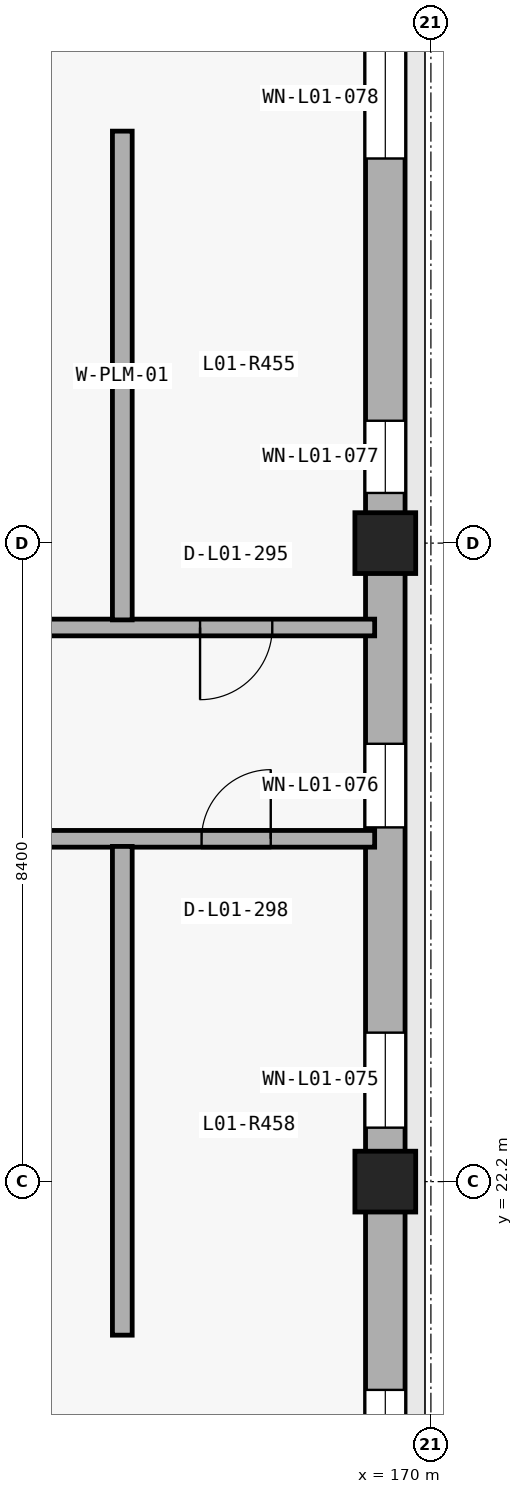
"""IFC4 building model, lengths in metres.
Left out: names, types, materials, properties, quantities, classifications, styles, units other than length and angle.
Written with IfcOpenShell. Run it as: python <this file> out.ifc"""

import sys

from ifc_helpers import new_model, si_unit, direction, frame, frame_2d, origin_with_axes, origin_2d_with_axis, place, context, subcontext, project, spatial, rectangle, circle, extrude, element, fill, save


model = new_model("IFC4")
c1 = context("Model", 3, precision=1e-05, world=origin_with_axes(), true_north=direction((0.0, 1.0)))
c2 = subcontext(c1, "Body", "Model", "MODEL_VIEW")
j1 = project(units=[si_unit("LENGTHUNIT", "METRE"), si_unit("PLANEANGLEUNIT", "RADIAN")], contexts=[c1])
p1 = place(None, origin_with_axes())
s1 = spatial("IfcSite", under=j1, at=p1, CompositionType="ELEMENT")
p2 = place(p1, origin_with_axes())
s2 = spatial("IfcBuilding", under=s1, at=p2, CompositionType="ELEMENT")
p3 = place(p2, frame((0.0, 0.0, 5.4), z_axis=(0.0, 0.0, 1.0), x_axis=(1.0, 0.0, 0.0)))
s3 = spatial("IfcBuildingStorey", under=s2, at=p3, CompositionType="ELEMENT", Elevation=5.4)
p4 = place(None, frame((169.4, 7.06, 5.4), z_axis=(0.0, 0.0, 1.0), x_axis=(0.0, 1.0, 0.0)))
e1 = element("IfcWall", 1, at=p4, inside=s3, PredefinedType="SOLIDWALL", context=c2, shape_type="SweptSolid", body=[
    extrude(rectangle(XDim=54.48, YDim=0.52, at=frame_2d((27.24, 0.0), x_axis=(1.0, 0.0))), origin_with_axes(), (0.0, 0.0, 1.0), 4.714),
])
p5 = place(None, frame((169.4, 10.31, 8.1), z_axis=(0.0, 0.0, 1.0), x_axis=(0.0, 1.0, 0.0)))
e2 = element("IfcOpeningElement", 2, at=p5, cuts=e1, PredefinedType="OPENING", context=c2, shape_type="SweptSolid", body=[
    extrude(rectangle(XDim=2.1, YDim=1.3, at=frame_2d((0.0, 0.65), x_axis=(1.0, 0.0))), frame((0.0, 0.27, 0.0), z_axis=(0.0, -1.0, 0.0), x_axis=(1.0, 0.0, 0.0)), (0.0, 0.0, 1.0), 0.54),
])
p6 = place(None, frame((169.4, 15.46, 8.15), z_axis=(0.0, 0.0, 1.0), x_axis=(0.0, 1.0, 0.0)))
e3 = element("IfcOpeningElement", 3, at=p6, cuts=e1, PredefinedType="OPENING", context=c2, shape_type="SweptSolid", body=[
    extrude(rectangle(XDim=1.8, YDim=1.2, at=frame_2d((0.0, 0.6), x_axis=(1.0, 0.0))), frame((0.0, 0.27, 0.0), z_axis=(0.0, -1.0, 0.0), x_axis=(1.0, 0.0, 0.0)), (0.0, 0.0, 1.0), 0.54),
])
p7 = place(None, frame((169.4, 18.76, 6.3), z_axis=(0.0, 0.0, 1.0), x_axis=(0.0, 1.0, 0.0)))
e4 = element("IfcOpeningElement", 4, at=p7, cuts=e1, PredefinedType="OPENING", context=c2, shape_type="SweptSolid", body=[
    extrude(rectangle(XDim=1.4, YDim=2.2, at=frame_2d((0.0, 1.1), x_axis=(1.0, 0.0))), frame((0.0, 0.27, 0.0), z_axis=(0.0, -1.0, 0.0), x_axis=(1.0, 0.0, 0.0)), (0.0, 0.0, 1.0), 0.54),
])
p8 = place(None, frame((169.4, 23.535, 6.3), z_axis=(0.0, 0.0, 1.0), x_axis=(0.0, 1.0, 0.0)))
e5 = element("IfcOpeningElement", 5, at=p8, cuts=e1, PredefinedType="OPENING", context=c2, shape_type="SweptSolid", body=[
    extrude(rectangle(XDim=1.25, YDim=2.1, at=frame_2d((0.0, 1.05), x_axis=(1.0, 0.0))), frame((0.0, 0.27, 0.0), z_axis=(0.0, -1.0, 0.0), x_axis=(1.0, 0.0, 0.0)), (0.0, 0.0, 1.0), 0.54),
])
p9 = place(None, frame((169.4, 27.41, 6.35), z_axis=(0.0, 0.0, 1.0), x_axis=(0.0, 1.0, 0.0)))
e6 = element("IfcOpeningElement", 6, at=p9, cuts=e1, PredefinedType="OPENING", context=c2, shape_type="SweptSolid", body=[
    extrude(rectangle(XDim=1.1, YDim=2.0, at=frame_2d((0.0, 1.0), x_axis=(1.0, 0.0))), frame((0.0, 0.27, 0.0), z_axis=(0.0, -1.0, 0.0), x_axis=(1.0, 0.0, 0.0)), (0.0, 0.0, 1.0), 0.54),
])
p10 = place(None, frame((169.4, 31.735, 6.35), z_axis=(0.0, 0.0, 1.0), x_axis=(0.0, 1.0, 0.0)))
e7 = element("IfcOpeningElement", 7, at=p10, cuts=e1, PredefinedType="OPENING", context=c2, shape_type="SweptSolid", body=[
    extrude(rectangle(XDim=0.95, YDim=1.95, at=frame_2d((0.0, 0.975), x_axis=(1.0, 0.0))), frame((0.0, 0.27, 0.0), z_axis=(0.0, -1.0, 0.0), x_axis=(1.0, 0.0, 0.0)), (0.0, 0.0, 1.0), 0.54),
])
p11 = place(None, frame((169.4, 36.46, 6.25), z_axis=(0.0, 0.0, 1.0), x_axis=(0.0, 1.0, 0.0)))
e8 = element("IfcOpeningElement", 8, at=p11, cuts=e1, PredefinedType="OPENING", context=c2, shape_type="SweptSolid", body=[
    extrude(rectangle(XDim=1.6, YDim=3.1, at=frame_2d((0.0, 1.55), x_axis=(1.0, 0.0))), frame((0.0, 0.27, 0.0), z_axis=(0.0, -1.0, 0.0), x_axis=(1.0, 0.0, 0.0)), (0.0, 0.0, 1.0), 0.54),
])
p12 = place(None, frame((169.4, 40.785, 6.3), z_axis=(0.0, 0.0, 1.0), x_axis=(0.0, 1.0, 0.0)))
e9 = element("IfcOpeningElement", 9, at=p12, cuts=e1, PredefinedType="OPENING", context=c2, shape_type="SweptSolid", body=[
    extrude(rectangle(XDim=1.45, YDim=2.85, at=frame_2d((0.0, 1.425), x_axis=(1.0, 0.0))), frame((0.0, 0.27, 0.0), z_axis=(0.0, -1.0, 0.0), x_axis=(1.0, 0.0, 0.0)), (0.0, 0.0, 1.0), 0.54),
])
p13 = place(None, frame((169.4, 44.835, 6.3), z_axis=(0.0, 0.0, 1.0), x_axis=(0.0, 1.0, 0.0)))
e10 = element("IfcOpeningElement", 10, at=p13, cuts=e1, PredefinedType="OPENING", context=c2, shape_type="SweptSolid", body=[
    extrude(rectangle(XDim=1.65, YDim=2.4, at=frame_2d((0.0, 1.2), x_axis=(1.0, 0.0))), frame((0.0, 0.27, 0.0), z_axis=(0.0, -1.0, 0.0), x_axis=(1.0, 0.0, 0.0)), (0.0, 0.0, 1.0), 0.54),
])
p14 = place(None, frame((169.4, 49.51, 6.3), z_axis=(0.0, 0.0, 1.0), x_axis=(0.0, 1.0, 0.0)))
e11 = element("IfcOpeningElement", 11, at=p14, cuts=e1, PredefinedType="OPENING", context=c2, shape_type="SweptSolid", body=[
    extrude(rectangle(XDim=1.3, YDim=2.25, at=frame_2d((0.0, 1.125), x_axis=(1.0, 0.0))), frame((0.0, 0.27, 0.0), z_axis=(0.0, -1.0, 0.0), x_axis=(1.0, 0.0, 0.0)), (0.0, 0.0, 1.0), 0.54),
])
p15 = place(None, frame((169.4, 53.485, 7.05), z_axis=(0.0, 0.0, 1.0), x_axis=(0.0, 1.0, 0.0)))
e12 = element("IfcOpeningElement", 12, at=p15, cuts=e1, PredefinedType="OPENING", context=c2, shape_type="SweptSolid", body=[
    extrude(rectangle(XDim=0.45, YDim=1.8, at=frame_2d((0.0, 0.9), x_axis=(1.0, 0.0))), frame((0.0, 0.27, 0.0), z_axis=(0.0, -1.0, 0.0), x_axis=(1.0, 0.0, 0.0)), (0.0, 0.0, 1.0), 0.54),
])
p16 = place(None, frame((141.755, 29.49, 5.4), z_axis=(0.0, 0.0, 1.0), x_axis=(1.0, 0.0, 0.0)))
e13 = element("IfcWall", 13, at=p16, inside=s3, PredefinedType="PARTITIONING", context=c2, shape_type="SweptSolid", body=[
    extrude(rectangle(XDim=27.505, YDim=0.22, at=frame_2d((13.752, 0.0), x_axis=(1.0, 0.0))), origin_with_axes(), (0.0, 0.0, 1.0), 5.08),
])
p17 = place(None, frame((155.877, 29.49, 5.4), z_axis=(0.0, 0.0, 1.0), x_axis=(1.0, 0.0, 0.0)))
e14 = element("IfcOpeningElement", 14, at=p17, cuts=e13, PredefinedType="OPENING", context=c2, shape_type="SweptSolid", body=[
    extrude(rectangle(XDim=1.08, YDim=2.18, at=frame_2d((0.0, 1.09), x_axis=(1.0, 0.0))), frame((0.0, 0.12, 0.0), z_axis=(0.0, -1.0, 0.0), x_axis=(1.0, 0.0, 0.0)), (0.0, 0.0, 1.0), 0.24),
])
p18 = place(None, frame((167.438, 29.49, 5.4), z_axis=(0.0, 0.0, 1.0), x_axis=(1.0, 0.0, 0.0)))
e15 = element("IfcOpeningElement", 15, at=p18, cuts=e13, PredefinedType="OPENING", context=c2, shape_type="SweptSolid", body=[
    extrude(rectangle(XDim=0.95, YDim=2.1, at=frame_2d((0.0, 1.05), x_axis=(1.0, 0.0))), frame((0.0, 0.12, 0.0), z_axis=(0.0, -1.0, 0.0), x_axis=(1.0, 0.0, 0.0)), (0.0, 0.0, 1.0), 0.24),
])
p19 = place(None, frame((121.94, 26.71, 5.4), z_axis=(0.0, 0.0, 1.0), x_axis=(1.0, 0.0, 0.0)))
e16 = element("IfcWall", 16, at=p19, inside=s3, PredefinedType="PARTITIONING", context=c2, shape_type="SweptSolid", body=[
    extrude(rectangle(XDim=47.32, YDim=0.22, at=frame_2d((23.66, 0.0), x_axis=(1.0, 0.0))), origin_with_axes(), (0.0, 0.0, 1.0), 5.08),
])
p20 = place(None, frame((133.46, 26.71, 5.4), z_axis=(0.0, 0.0, 1.0), x_axis=(1.0, 0.0, 0.0)))
e17 = element("IfcOpeningElement", 17, at=p20, cuts=e16, PredefinedType="OPENING", context=c2, shape_type="SweptSolid", body=[
    extrude(rectangle(XDim=1.76, YDim=2.26, at=frame_2d((0.0, 1.13), x_axis=(1.0, 0.0))), frame((0.0, 0.12, 0.0), z_axis=(0.0, -1.0, 0.0), x_axis=(1.0, 0.0, 0.0)), (0.0, 0.0, 1.0), 0.24),
])
p21 = place(None, frame((155.298, 26.71, 5.4), z_axis=(0.0, 0.0, 1.0), x_axis=(1.0, 0.0, 0.0)))
e18 = element("IfcOpeningElement", 18, at=p21, cuts=e16, PredefinedType="OPENING", context=c2, shape_type="SweptSolid", body=[
    extrude(rectangle(XDim=1.24, YDim=2.22, at=frame_2d((0.0, 1.11), x_axis=(1.0, 0.0))), frame((0.0, 0.12, 0.0), z_axis=(0.0, -1.0, 0.0), x_axis=(1.0, 0.0, 0.0)), (0.0, 0.0, 1.0), 0.24),
])
p22 = place(None, frame((167.438, 26.71, 5.4), z_axis=(0.0, 0.0, 1.0), x_axis=(1.0, 0.0, 0.0)))
e19 = element("IfcOpeningElement", 19, at=p22, cuts=e16, PredefinedType="OPENING", context=c2, shape_type="SweptSolid", body=[
    extrude(rectangle(XDim=0.91, YDim=2.12, at=frame_2d((0.0, 1.06), x_axis=(1.0, 0.0))), frame((0.0, 0.12, 0.0), z_axis=(0.0, -1.0, 0.0), x_axis=(1.0, 0.0, 0.0)), (0.0, 0.0, 1.0), 0.24),
])
p23 = place(None, frame((165.94, 29.59, 5.4), z_axis=(0.0, 0.0, 1.0), x_axis=(0.0, 1.0, 0.0)))
e20 = element("IfcWall", 20, at=p23, inside=s3, PredefinedType="PLUMBINGWALL", context=c2, shape_type="SweptSolid", body=[
    extrude(rectangle(XDim=6.43, YDim=0.26, at=frame_2d((3.215, 0.0), x_axis=(1.0, 0.0))), origin_with_axes(), (0.0, 0.0, 1.0), 5.08),
])
p24 = place(None, frame((165.94, 20.18, 5.4), z_axis=(0.0, 0.0, 1.0), x_axis=(0.0, 1.0, 0.0)))
e21 = element("IfcWall", 21, at=p24, inside=s3, PredefinedType="PLUMBINGWALL", context=c2, shape_type="SweptSolid", body=[
    extrude(rectangle(XDim=6.43, YDim=0.26, at=frame_2d((3.215, 0.0), x_axis=(1.0, 0.0))), origin_with_axes(), (0.0, 0.0, 1.0), 5.08),
])
for number, where, z_axis, x_axis in (
    (22, (169.4, 22.2, 5.4), (0.0, 0.0, 1.0), (1.0, 0.0, 0.0)),
    (23, (169.4, 30.6, 5.4), (0.0, 0.0, 1.0), (1.0, 0.0, 0.0)),
):
    element("IfcColumn", number, at=place(None, frame(where, z_axis=z_axis, x_axis=x_axis)), inside=s3, PredefinedType="COLUMN", context=c2, shape_type="SweptSolid", body=[
        extrude(circle(Radius=0.4, at=origin_2d_with_axis()), origin_with_axes(), (0.0, 0.0, 1.0), 5.4),
    ])
p25 = place(None, frame((167.438, 29.49, 5.4), z_axis=(0.0, 0.0, 1.0), x_axis=(-1.0, 0.0, 0.0)))
e24 = element("IfcDoor", 24, at=p25, inside=s3, OperationType="SINGLE_SWING_LEFT", PredefinedType="DOOR", context=c2, shape_type="SweptSolid", body=[
    extrude(rectangle(XDim=0.95, YDim=2.1, at=frame_2d((0.0, 1.05), x_axis=(1.0, 0.0))), frame((0.0, 0.04, 0.0), z_axis=(0.0, -1.0, 0.0), x_axis=(1.0, 0.0, 0.0)), (0.0, 0.0, 1.0), 0.08),
])
fill(e15, e24)
p26 = place(None, frame((167.438, 26.71, 5.4), z_axis=(0.0, 0.0, 1.0), x_axis=(1.0, 0.0, 0.0)))
e25 = element("IfcDoor", 25, at=p26, inside=s3, OperationType="SINGLE_SWING_RIGHT", PredefinedType="DOOR", context=c2, shape_type="SweptSolid", body=[
    extrude(rectangle(XDim=0.91, YDim=2.12, at=frame_2d((0.0, 1.06), x_axis=(1.0, 0.0))), frame((0.0, 0.04, 0.0), z_axis=(0.0, -1.0, 0.0), x_axis=(1.0, 0.0, 0.0)), (0.0, 0.0, 1.0), 0.08),
])
fill(e19, e25)
p27 = place(None, frame((169.4, 18.76, 6.3), z_axis=(0.0, 0.0, 1.0), x_axis=(0.0, 1.0, 0.0)))
e26 = element("IfcWindow", 26, at=p27, inside=s3, PartitioningType="SINGLE_PANEL", PredefinedType="WINDOW", context=c2, shape_type="SweptSolid", body=[
    extrude(rectangle(XDim=1.4, YDim=2.2, at=frame_2d((0.0, 1.1), x_axis=(1.0, 0.0))), frame((0.0, 0.03, 0.0), z_axis=(0.0, -1.0, 0.0), x_axis=(1.0, 0.0, 0.0)), (0.0, 0.0, 1.0), 0.06),
])
fill(e4, e26)
p28 = place(None, frame((169.4, 23.535, 6.3), z_axis=(0.0, 0.0, 1.0), x_axis=(0.0, 1.0, 0.0)))
e27 = element("IfcWindow", 27, at=p28, inside=s3, PartitioningType="SINGLE_PANEL", PredefinedType="WINDOW", context=c2, shape_type="SweptSolid", body=[
    extrude(rectangle(XDim=1.25, YDim=2.1, at=frame_2d((0.0, 1.05), x_axis=(1.0, 0.0))), frame((0.0, 0.03, 0.0), z_axis=(0.0, -1.0, 0.0), x_axis=(1.0, 0.0, 0.0)), (0.0, 0.0, 1.0), 0.06),
])
fill(e5, e27)
p29 = place(None, frame((169.4, 27.41, 6.35), z_axis=(0.0, 0.0, 1.0), x_axis=(0.0, 1.0, 0.0)))
e28 = element("IfcWindow", 28, at=p29, inside=s3, PartitioningType="SINGLE_PANEL", PredefinedType="WINDOW", context=c2, shape_type="SweptSolid", body=[
    extrude(rectangle(XDim=1.1, YDim=2.0, at=frame_2d((0.0, 1.0), x_axis=(1.0, 0.0))), frame((0.0, 0.03, 0.0), z_axis=(0.0, -1.0, 0.0), x_axis=(1.0, 0.0, 0.0)), (0.0, 0.0, 1.0), 0.06),
])
fill(e6, e28)
p30 = place(None, frame((169.4, 31.735, 6.35), z_axis=(0.0, 0.0, 1.0), x_axis=(0.0, 1.0, 0.0)))
e29 = element("IfcWindow", 29, at=p30, inside=s3, PartitioningType="SINGLE_PANEL", PredefinedType="WINDOW", context=c2, shape_type="SweptSolid", body=[
    extrude(rectangle(XDim=0.95, YDim=1.95, at=frame_2d((0.0, 0.975), x_axis=(1.0, 0.0))), frame((0.0, 0.03, 0.0), z_axis=(0.0, -1.0, 0.0), x_axis=(1.0, 0.0, 0.0)), (0.0, 0.0, 1.0), 0.06),
])
fill(e7, e29)
p31 = place(None, frame((169.4, 36.46, 6.25), z_axis=(0.0, 0.0, 1.0), x_axis=(0.0, 1.0, 0.0)))
e30 = element("IfcWindow", 30, at=p31, inside=s3, PartitioningType="SINGLE_PANEL", PredefinedType="WINDOW", context=c2, shape_type="SweptSolid", body=[
    extrude(rectangle(XDim=1.6, YDim=3.1, at=frame_2d((0.0, 1.55), x_axis=(1.0, 0.0))), frame((0.0, 0.03, 0.0), z_axis=(0.0, -1.0, 0.0), x_axis=(1.0, 0.0, 0.0)), (0.0, 0.0, 1.0), 0.06),
])
fill(e8, e30)
save(model, sys.argv[1])
